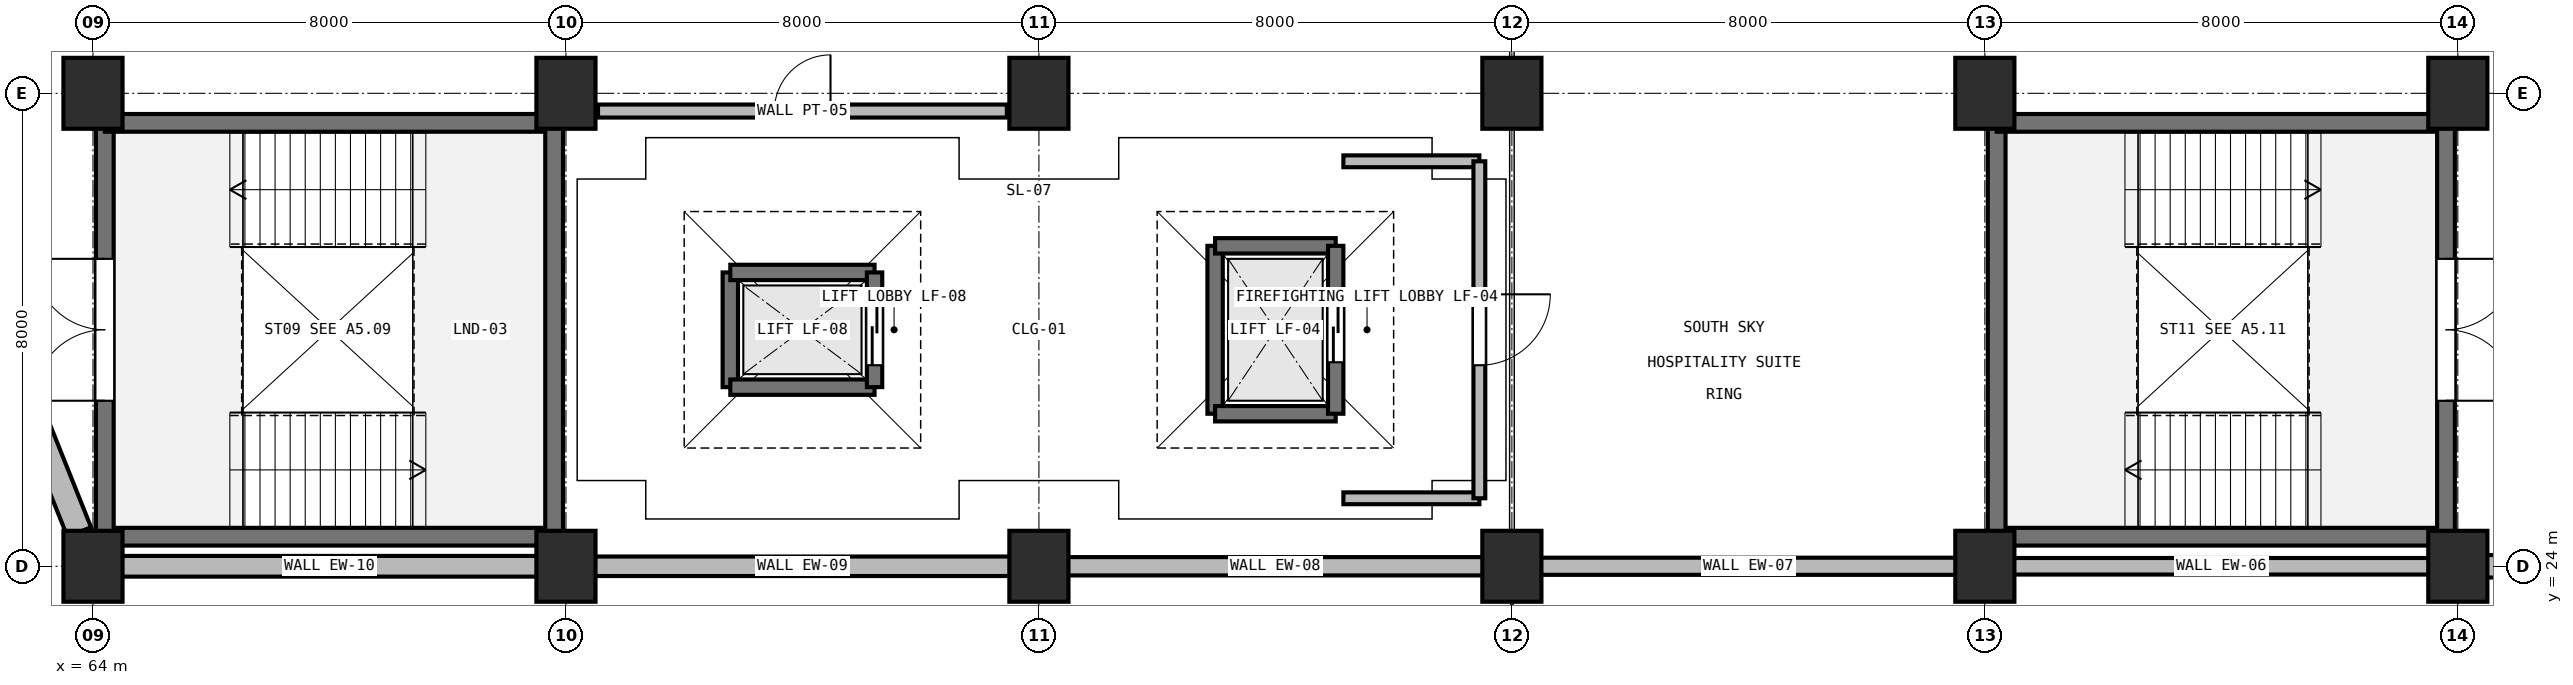
"""IFC4 building model, lengths in metres.
Left out: names, types, materials, properties, quantities, classifications, styles, units other than length and angle.
Written with IfcOpenShell. Run it as: python <this file> out.ifc"""

import sys

from ifc_helpers import new_model, si_unit, direction, frame, frame_2d, origin, origin_2d, place, context, subcontext, project, spatial, rectangle, extrude, element, fill, save


model = new_model("IFC4")
c1 = context("Model", 3, precision=1e-05, world=origin(), true_north=direction((0.0, 1.0)))
c2 = subcontext(c1, "Body", "Model", "MODEL_VIEW")
j1 = project(units=[si_unit("LENGTHUNIT", "METRE"), si_unit("PLANEANGLEUNIT", "RADIAN")], contexts=[c1])
p1 = place(None, origin())
s1 = spatial("IfcSite", under=j1, at=p1, CompositionType="ELEMENT")
p2 = place(p1, origin())
s2 = spatial("IfcBuilding", under=s1, at=p2, CompositionType="ELEMENT")
p3 = place(p2, frame((0.0, 0.0, 19.8)))
s3 = spatial("IfcBuildingStorey", under=s2, at=p3, CompositionType="ELEMENT", Elevation=19.8)
for number, where, z_axis, x_axis in (
    (1, (64.0, 24.0, 0.0), (0.0, 0.0, 1.0), (1.0, 0.0, 0.0)),
    (2, (64.0, 32.0, 0.0), (0.0, 0.0, 1.0), (1.0, 0.0, 0.0)),
    (3, (72.0, 24.0, 0.0), (0.0, 0.0, 1.0), (1.0, 0.0, 0.0)),
    (4, (72.0, 32.0, 0.0), (0.0, 0.0, 1.0), (1.0, 0.0, 0.0)),
    (5, (80.0, 24.0, 0.0), (0.0, 0.0, 1.0), (1.0, 0.0, 0.0)),
    (6, (80.0, 32.0, 0.0), (0.0, 0.0, 1.0), (1.0, 0.0, 0.0)),
    (7, (88.0, 24.0, 0.0), (0.0, 0.0, 1.0), (1.0, 0.0, 0.0)),
    (8, (88.0, 32.0, 0.0), (0.0, 0.0, 1.0), (1.0, 0.0, 0.0)),
    (9, (96.0, 24.0, 0.0), (0.0, 0.0, 1.0), (1.0, 0.0, 0.0)),
    (10, (96.0, 32.0, 0.0), (0.0, 0.0, 1.0), (1.0, 0.0, 0.0)),
    (11, (104.0, 24.0, 0.0), (0.0, 0.0, 1.0), (1.0, 0.0, 0.0)),
    (12, (104.0, 32.0, 0.0), (0.0, 0.0, 1.0), (1.0, 0.0, 0.0)),
):
    element("IfcColumn", number, at=place(p3, frame(where, z_axis=z_axis, x_axis=x_axis)), inside=s3, PredefinedType="COLUMN", context=c2, shape_type="SweptSolid", body=[
        extrude(rectangle(XDim=1.0, YDim=1.2, at=origin_2d()), origin(), (0.0, 0.0, 1.0), 4.8),
    ])
p4 = place(p3, frame((111.52, 24.0, 0.0), z_axis=(0.0, 0.0, 1.0), x_axis=(-1.0, 0.0, 0.0)))
e13 = element("IfcWall", 13, at=p4, inside=s3, PredefinedType="SOLIDWALL", context=c2, shape_type="SweptSolid", body=[
    extrude(rectangle(XDim=7.04, YDim=0.38, at=frame_2d((3.52, 0.0))), origin(), (0.0, 0.0, 1.0), 3.6),
])
p5 = place(p3, frame((103.52, 24.0, 0.0), z_axis=(0.0, 0.0, 1.0), x_axis=(-1.0, 0.0, 0.0)))
e14 = element("IfcWall", 14, at=p5, inside=s3, PredefinedType="SOLIDWALL", context=c2, shape_type="SweptSolid", body=[
    extrude(rectangle(XDim=7.04, YDim=0.28, at=frame_2d((3.52, 0.0))), origin(), (0.0, 0.0, 1.0), 3.6),
])
p6 = place(p3, frame((95.52, 24.0, 0.0), z_axis=(0.0, 0.0, 1.0), x_axis=(-1.0, 0.0, 0.0)))
e15 = element("IfcWall", 15, at=p6, inside=s3, PredefinedType="SOLIDWALL", context=c2, shape_type="SweptSolid", body=[
    extrude(rectangle(XDim=7.04, YDim=0.29, at=frame_2d((3.52, 0.0))), origin(), (0.0, 0.0, 1.0), 3.6),
])
p7 = place(p3, frame((87.52, 24.0, 0.0), z_axis=(0.0, 0.0, 1.0), x_axis=(-1.0, 0.0, 0.0)))
e16 = element("IfcWall", 16, at=p7, inside=s3, PredefinedType="SOLIDWALL", context=c2, shape_type="SweptSolid", body=[
    extrude(rectangle(XDim=7.04, YDim=0.31, at=frame_2d((3.52, 0.0))), origin(), (0.0, 0.0, 1.0), 3.6),
])
p8 = place(p3, frame((79.52, 24.0, 0.0), z_axis=(0.0, 0.0, 1.0), x_axis=(-1.0, 0.0, 0.0)))
e17 = element("IfcWall", 17, at=p8, inside=s3, PredefinedType="SOLIDWALL", context=c2, shape_type="SweptSolid", body=[
    extrude(rectangle(XDim=7.04, YDim=0.33, at=frame_2d((3.52, 0.0))), origin(), (0.0, 0.0, 1.0), 3.6),
])
p9 = place(p3, frame((71.52, 24.0, 0.0), z_axis=(0.0, 0.0, 1.0), x_axis=(-1.0, 0.0, 0.0)))
e18 = element("IfcWall", 18, at=p9, inside=s3, PredefinedType="SOLIDWALL", context=c2, shape_type="SweptSolid", body=[
    extrude(rectangle(XDim=7.04, YDim=0.35, at=frame_2d((3.52, 0.0))), origin(), (0.0, 0.0, 1.0), 3.6),
])
p10 = place(p3, frame((63.768, 24.58, 0.0), z_axis=(0.0, 0.0, 1.0), x_axis=(-0.371395943584, 0.928474583976, 0.0)))
e19 = element("IfcWall", 19, at=p10, inside=s3, PredefinedType="SOLIDWALL", context=c2, shape_type="SweptSolid", body=[
    extrude(rectangle(XDim=7.991, YDim=0.43, at=frame_2d((3.996, 0.0))), origin(), (0.0, 0.0, 1.0), 3.45),
])
p11 = place(p3, frame((71.8, 24.5, 0.0), z_axis=(0.0, 0.0, 1.0), x_axis=(-1.0, 0.0, 0.0)))
e20 = element("IfcWall", 20, at=p11, inside=s3, PredefinedType="SHEAR", context=c2, shape_type="SweptSolid", body=[
    extrude(rectangle(XDim=7.6, YDim=0.3, at=frame_2d((3.8, 0.0))), origin(), (0.0, 0.0, 1.0), 4.5),
])
p12 = place(p3, frame((64.2, 24.5, 0.0), z_axis=(0.0, 0.0, 1.0), x_axis=(0.0, 1.0, 0.0)))
e21 = element("IfcWall", 21, at=p12, inside=s3, PredefinedType="SHEAR", context=c2, shape_type="SweptSolid", body=[
    extrude(rectangle(XDim=7.0, YDim=0.3, at=frame_2d((3.5, 0.0))), origin(), (0.0, 0.0, 1.0), 4.5),
])
p13 = place(p12, frame((2.3, 0.0, 0.0)))
e22 = element("IfcOpeningElement", 22, at=p13, cuts=e21, PredefinedType="OPENING", context=c2, shape_type="SweptSolid", body=[
    extrude(rectangle(XDim=2.4, YDim=2.2, at=frame_2d((1.2, 1.1))), frame((0.0, 0.16, 0.0), z_axis=(0.0, -1.0, 0.0), x_axis=(1.0, 0.0, 0.0)), (0.0, 0.0, 1.0), 0.32),
])
p14 = place(p3, frame((64.2, 31.5, 0.0), z_axis=(0.0, 0.0, 1.0), x_axis=(1.0, 0.0, 0.0)))
e23 = element("IfcWall", 23, at=p14, inside=s3, PredefinedType="SHEAR", context=c2, shape_type="SweptSolid", body=[
    extrude(rectangle(XDim=7.6, YDim=0.3, at=frame_2d((3.8, 0.0))), origin(), (0.0, 0.0, 1.0), 4.5),
])
p15 = place(p3, frame((71.8, 31.5, 0.0), z_axis=(0.0, 0.0, 1.0), x_axis=(0.0, -1.0, 0.0)))
e24 = element("IfcWall", 24, at=p15, inside=s3, PredefinedType="SHEAR", context=c2, shape_type="SweptSolid", body=[
    extrude(rectangle(XDim=7.0, YDim=0.3, at=frame_2d((3.5, 0.0))), origin(), (0.0, 0.0, 1.0), 4.5),
])
p16 = place(p3, frame((103.8, 24.5, 0.0), z_axis=(0.0, 0.0, 1.0), x_axis=(-1.0, 0.0, 0.0)))
e25 = element("IfcWall", 25, at=p16, inside=s3, PredefinedType="SHEAR", context=c2, shape_type="SweptSolid", body=[
    extrude(rectangle(XDim=7.6, YDim=0.3, at=frame_2d((3.8, 0.0))), origin(), (0.0, 0.0, 1.0), 4.5),
])
p17 = place(p3, frame((96.2, 24.5, 0.0), z_axis=(0.0, 0.0, 1.0), x_axis=(0.0, 1.0, 0.0)))
e26 = element("IfcWall", 26, at=p17, inside=s3, PredefinedType="SHEAR", context=c2, shape_type="SweptSolid", body=[
    extrude(rectangle(XDim=7.0, YDim=0.3, at=frame_2d((3.5, 0.0))), origin(), (0.0, 0.0, 1.0), 4.5),
])
p18 = place(p3, frame((96.2, 31.5, 0.0), z_axis=(0.0, 0.0, 1.0), x_axis=(1.0, 0.0, 0.0)))
e27 = element("IfcWall", 27, at=p18, inside=s3, PredefinedType="SHEAR", context=c2, shape_type="SweptSolid", body=[
    extrude(rectangle(XDim=7.6, YDim=0.3, at=frame_2d((3.8, 0.0))), origin(), (0.0, 0.0, 1.0), 4.5),
])
p19 = place(p3, frame((103.8, 31.5, 0.0), z_axis=(0.0, 0.0, 1.0), x_axis=(0.0, -1.0, 0.0)))
e28 = element("IfcWall", 28, at=p19, inside=s3, PredefinedType="SHEAR", context=c2, shape_type="SweptSolid", body=[
    extrude(rectangle(XDim=7.0, YDim=0.3, at=frame_2d((3.5, 0.0))), origin(), (0.0, 0.0, 1.0), 4.5),
])
p20 = place(p19, frame((2.3, 0.0, 0.0)))
e29 = element("IfcOpeningElement", 29, at=p20, cuts=e28, PredefinedType="OPENING", context=c2, shape_type="SweptSolid", body=[
    extrude(rectangle(XDim=2.4, YDim=2.2, at=frame_2d((1.2, 1.1))), frame((0.0, 0.16, 0.0), z_axis=(0.0, -1.0, 0.0), x_axis=(1.0, 0.0, 0.0)), (0.0, 0.0, 1.0), 0.32),
])
p21 = place(p3, frame((82.98, 26.58, 0.0), z_axis=(0.0, 0.0, 1.0), x_axis=(0.0, 1.0, 0.0)))
e30 = element("IfcWall", 30, at=p21, inside=s3, PredefinedType="SHEAR", context=c2, shape_type="SweptSolid", body=[
    extrude(rectangle(XDim=2.84, YDim=0.26, at=frame_2d((1.42, 0.0))), origin(), (0.0, 0.0, 1.0), 4.5),
])
for number, where, z_axis, x_axis in (
    (31, (82.98, 29.42, 0.0), (0.0, 0.0, 1.0), (1.0, 0.0, 0.0)),
    (32, (85.02, 26.58, 0.0), (0.0, 0.0, 1.0), (-1.0, 0.0, 0.0)),
):
    element("IfcWall", number, at=place(p3, frame(where, z_axis=z_axis, x_axis=x_axis)), inside=s3, PredefinedType="SHEAR", context=c2, shape_type="SweptSolid", body=[
        extrude(rectangle(XDim=2.04, YDim=0.26, at=frame_2d((1.02, 0.0))), origin(), (0.0, 0.0, 1.0), 4.5),
    ])
p22 = place(p3, frame((85.02, 29.42, 0.0), z_axis=(0.0, 0.0, 1.0), x_axis=(0.0, -1.0, 0.0)))
e33 = element("IfcWall", 33, at=p22, inside=s3, PredefinedType="SHEAR", context=c2, shape_type="SweptSolid", body=[
    extrude(rectangle(XDim=2.84, YDim=0.26, at=frame_2d((1.42, 0.0))), origin(), (0.0, 0.0, 1.0), 4.5),
])
p23 = place(p22, frame((0.87, 0.0, 0.0)))
e34 = element("IfcOpeningElement", 34, at=p23, cuts=e33, PredefinedType="OPENING", context=c2, shape_type="SweptSolid", body=[
    extrude(rectangle(XDim=1.1, YDim=2.15, at=frame_2d((0.55, 1.075))), frame((0.0, 0.14, 0.0), z_axis=(0.0, -1.0, 0.0), x_axis=(1.0, 0.0, 0.0)), (0.0, 0.0, 1.0), 0.28),
])
for number, where, z_axis, x_axis in (
    (35, (85.15, 30.85, 0.0), (0.0, 0.0, 1.0), (1.0, 0.0, 0.0)),
    (36, (87.45, 25.15, 0.0), (0.0, 0.0, 1.0), (-1.0, 0.0, 0.0)),
):
    element("IfcWall", number, at=place(p3, frame(where, z_axis=z_axis, x_axis=x_axis)), inside=s3, PredefinedType="PARTITIONING", context=c2, shape_type="SweptSolid", body=[
        extrude(rectangle(XDim=2.3, YDim=0.2, at=frame_2d((1.15, 0.0))), origin(), (0.0, 0.0, 1.0), 4.5),
    ])
p24 = place(p3, frame((87.45, 30.85, 0.0), z_axis=(0.0, 0.0, 1.0), x_axis=(0.0, -1.0, 0.0)))
e37 = element("IfcWall", 37, at=p24, inside=s3, PredefinedType="PARTITIONING", context=c2, shape_type="SweptSolid", body=[
    extrude(rectangle(XDim=5.7, YDim=0.2, at=frame_2d((2.85, 0.0))), origin(), (0.0, 0.0, 1.0), 3.6),
])
p25 = place(p24, frame((2.25, 0.0, 0.0)))
e38 = element("IfcOpeningElement", 38, at=p25, cuts=e37, PredefinedType="OPENING", context=c2, shape_type="SweptSolid", body=[
    extrude(rectangle(XDim=1.2, YDim=2.2, at=frame_2d((0.6, 1.1))), frame((0.0, 0.11, 0.0), z_axis=(0.0, -1.0, 0.0), x_axis=(1.0, 0.0, 0.0)), (0.0, 0.0, 1.0), 0.22),
])
p26 = place(p3, frame((74.78, 27.03, 0.0), z_axis=(0.0, 0.0, 1.0), x_axis=(0.0, 1.0, 0.0)))
e39 = element("IfcWall", 39, at=p26, inside=s3, PredefinedType="SHEAR", context=c2, shape_type="SweptSolid", body=[
    extrude(rectangle(XDim=1.94, YDim=0.26, at=frame_2d((0.97, 0.0))), origin(), (0.0, 0.0, 1.0), 4.5),
])
for number, where, z_axis, x_axis in (
    (40, (74.78, 28.97, 0.0), (0.0, 0.0, 1.0), (1.0, 0.0, 0.0)),
    (41, (77.22, 27.03, 0.0), (0.0, 0.0, 1.0), (-1.0, 0.0, 0.0)),
):
    element("IfcWall", number, at=place(p3, frame(where, z_axis=z_axis, x_axis=x_axis)), inside=s3, PredefinedType="SHEAR", context=c2, shape_type="SweptSolid", body=[
        extrude(rectangle(XDim=2.44, YDim=0.26, at=frame_2d((1.22, 0.0))), origin(), (0.0, 0.0, 1.0), 4.5),
    ])
p27 = place(p3, frame((77.22, 28.97, 0.0), z_axis=(0.0, 0.0, 1.0), x_axis=(0.0, -1.0, 0.0)))
e42 = element("IfcWall", 42, at=p27, inside=s3, PredefinedType="SHEAR", context=c2, shape_type="SweptSolid", body=[
    extrude(rectangle(XDim=1.94, YDim=0.26, at=frame_2d((0.97, 0.0))), origin(), (0.0, 0.0, 1.0), 4.5),
])
p28 = place(p27, frame((0.37, 0.0, 0.0)))
e43 = element("IfcOpeningElement", 43, at=p28, cuts=e42, PredefinedType="OPENING", context=c2, shape_type="SweptSolid", body=[
    extrude(rectangle(XDim=1.2, YDim=2.15, at=frame_2d((0.6, 1.075))), frame((0.0, 0.14, 0.0), z_axis=(0.0, -1.0, 0.0), x_axis=(1.0, 0.0, 0.0)), (0.0, 0.0, 1.0), 0.28),
])
p29 = place(p3, frame((72.542, 31.7, 0.0), z_axis=(0.0, 0.0, 1.0), x_axis=(1.0, 0.0, 0.0)))
e44 = element("IfcWall", 44, at=p29, inside=s3, PredefinedType="PARTITIONING", context=c2, shape_type="SweptSolid", body=[
    extrude(rectangle(XDim=6.916, YDim=0.22, at=frame_2d((3.458, 0.0))), origin(), (0.0, 0.0, 1.0), 3.6),
])
p30 = place(p29, frame((2.983, 0.0, 0.0)))
e45 = element("IfcOpeningElement", 45, at=p30, cuts=e44, PredefinedType="OPENING", context=c2, shape_type="SweptSolid", body=[
    extrude(rectangle(XDim=0.95, YDim=2.15, at=frame_2d((0.475, 1.075))), frame((0.0, 0.12, 0.0), z_axis=(0.0, -1.0, 0.0), x_axis=(1.0, 0.0, 0.0)), (0.0, 0.0, 1.0), 0.24),
])
p31 = place(p13, frame((2.4, 0.0, 0.0), z_axis=(0.0, 0.0, 1.0), x_axis=(-1.0, 0.0, 0.0)))
e46 = element("IfcDoor", 46, at=p31, inside=s3, OperationType="DOUBLE_DOOR_SINGLE_SWING", PredefinedType="DOOR", context=c2, shape_type="SweptSolid", body=[
    extrude(rectangle(XDim=2.4, YDim=2.2, at=frame_2d((1.2, 1.1))), frame((0.0, 0.025, 0.0), z_axis=(0.0, -1.0, 0.0), x_axis=(1.0, 0.0, 0.0)), (0.0, 0.0, 1.0), 0.05),
])
fill(e22, e46)
p32 = place(p20, frame((2.4, 0.0, 0.0), z_axis=(0.0, 0.0, 1.0), x_axis=(-1.0, 0.0, 0.0)))
e47 = element("IfcDoor", 47, at=p32, inside=s3, OperationType="DOUBLE_DOOR_SINGLE_SWING", PredefinedType="DOOR", context=c2, shape_type="SweptSolid", body=[
    extrude(rectangle(XDim=2.4, YDim=2.2, at=frame_2d((1.2, 1.1))), frame((0.0, 0.025, 0.0), z_axis=(0.0, -1.0, 0.0), x_axis=(1.0, 0.0, 0.0)), (0.0, 0.0, 1.0), 0.05),
])
fill(e29, e47)
p33 = place(p23, origin())
e48 = element("IfcDoor", 48, at=p33, inside=s3, OperationType="SLIDING_TO_LEFT", PredefinedType="DOOR", context=c2, shape_type="SweptSolid", body=[
    extrude(rectangle(XDim=1.1, YDim=2.15, at=frame_2d((0.55, 1.075))), frame((0.0, 0.025, 0.0), z_axis=(0.0, -1.0, 0.0), x_axis=(1.0, 0.0, 0.0)), (0.0, 0.0, 1.0), 0.05),
])
fill(e34, e48)
p34 = place(p25, origin())
e49 = element("IfcDoor", 49, at=p34, inside=s3, OperationType="SINGLE_SWING_LEFT", PredefinedType="DOOR", context=c2, shape_type="SweptSolid", body=[
    extrude(rectangle(XDim=1.2, YDim=2.2, at=frame_2d((0.6, 1.1))), frame((0.0, 0.025, 0.0), z_axis=(0.0, -1.0, 0.0), x_axis=(1.0, 0.0, 0.0)), (0.0, 0.0, 1.0), 0.05),
])
fill(e38, e49)
p35 = place(p28, origin())
e50 = element("IfcDoor", 50, at=p35, inside=s3, OperationType="SLIDING_TO_LEFT", PredefinedType="DOOR", context=c2, shape_type="SweptSolid", body=[
    extrude(rectangle(XDim=1.2, YDim=2.15, at=frame_2d((0.6, 1.075))), frame((0.0, 0.025, 0.0), z_axis=(0.0, -1.0, 0.0), x_axis=(1.0, 0.0, 0.0)), (0.0, 0.0, 1.0), 0.05),
])
fill(e43, e50)
p36 = place(p30, origin())
e51 = element("IfcDoor", 51, at=p36, inside=s3, OperationType="SINGLE_SWING_RIGHT", PredefinedType="DOOR", context=c2, shape_type="SweptSolid", body=[
    extrude(rectangle(XDim=0.95, YDim=2.15, at=frame_2d((0.475, 1.075))), frame((0.0, 0.025, 0.0), z_axis=(0.0, -1.0, 0.0), x_axis=(1.0, 0.0, 0.0)), (0.0, 0.0, 1.0), 0.05),
])
fill(e45, e51)
save(model, sys.argv[1])
